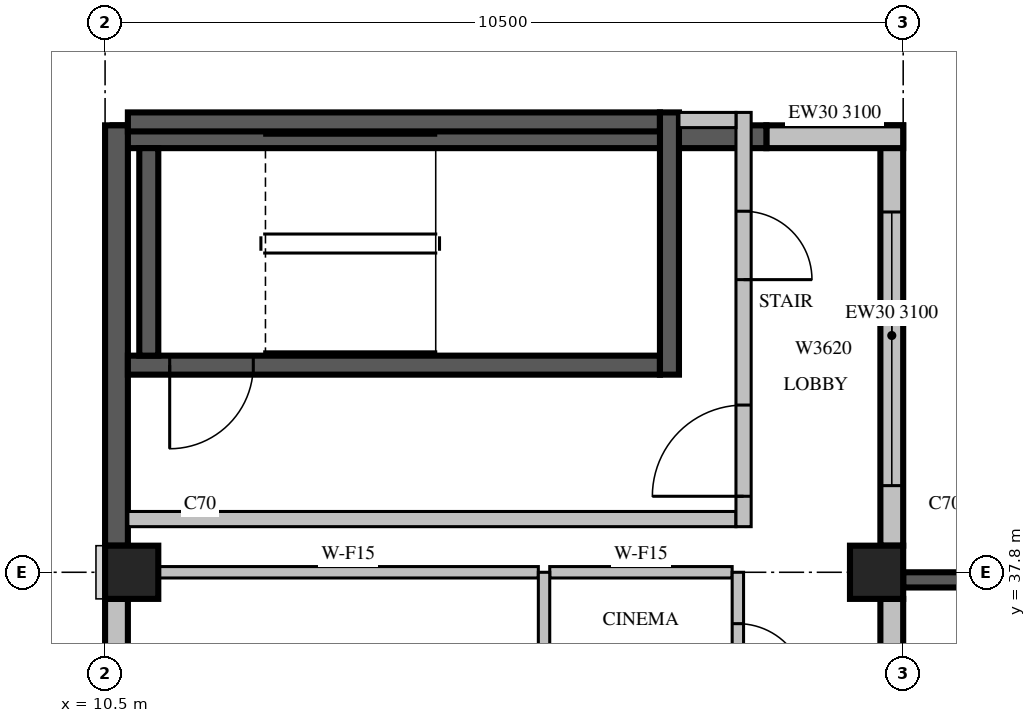
"""IFC4 building model, lengths in metres.
Left out: names, types, materials, properties, quantities, classifications, styles, units other than length and angle.
Written with IfcOpenShell. Run it as: python <this file> out.ifc"""

import sys

from ifc_helpers import new_model, si_unit, direction, frame, frame_2d, origin, origin_2d, place, context, subcontext, project, spatial, rectangle, extrude, source, transform, mapped, element, fill, save


model = new_model("IFC4")
c1 = context("Model", 3, precision=1e-05, world=origin(), true_north=direction((0.0, 1.0)))
c2 = subcontext(c1, "Body", "Model", "MODEL_VIEW")
j1 = project(units=[si_unit("LENGTHUNIT", "METRE"), si_unit("PLANEANGLEUNIT", "RADIAN")], contexts=[c1])
p1 = place(None, origin())
s1 = spatial("IfcSite", under=j1, at=p1, CompositionType="ELEMENT")
p2 = place(p1, origin())
s2 = spatial("IfcBuilding", under=s1, at=p2, CompositionType="ELEMENT")
p3 = place(p2, frame((0.0, 0.0, 302.0)))
s3 = spatial("IfcBuildingStorey", under=s2, at=p3, CompositionType="ELEMENT", Elevation=302.0)
m1 = source(origin(), c2, "Body", "SweptSolid", [
    extrude(rectangle(XDim=0.7, YDim=0.7, at=origin_2d()), origin(), (0.0, 0.0, 1.0), 3.5),
])
for number, where, z_axis, x_axis in (
    (1, (10.85, 37.8, 0.0), (0.0, 0.0, 1.0), (1.0, 0.0, 0.0)),
    (2, (20.65, 37.8, 0.0), (0.0, 0.0, 1.0), (1.0, 0.0, 0.0)),
):
    element("IfcColumn", number, at=place(p3, frame(where, z_axis=z_axis, x_axis=x_axis)), inside=s3, PredefinedType="COLUMN", context=c2, shape_type="MappedRepresentation", body=[
        mapped(m1, transform((0.0, 0.0, 0.0), scale=1.0)),
    ])
m2 = source(origin(), c2, "Body", "SweptSolid", [
    extrude(rectangle(XDim=3.9, YDim=0.2, at=frame_2d((1.95, 0.0))), origin(), (0.0, 0.0, 1.0), 3.1),
])
p4 = place(p3, frame((21.0, 37.7, 0.0), z_axis=(0.0, 0.0, 1.0), x_axis=(1.0, 0.0, 0.0)))
e3 = element("IfcWall", 3, at=p4, inside=s3, PredefinedType="SOLIDWALL", context=c2, shape_type="MappedRepresentation", body=[
    mapped(m2, transform((0.0, 0.0, 0.0), scale=1.0)),
])
m3 = source(origin(), c2, "Body", "SweptSolid", [
    extrude(rectangle(XDim=2.4, YDim=2.0, at=frame_2d((1.2, 1.0))), frame((0.0, 0.11, 0.0), z_axis=(0.0, -1.0, 0.0), x_axis=(1.0, 0.0, 0.0)), (0.0, 0.0, 1.0), 0.22),
])
p5 = place(p4, frame((0.75, 0.0, 0.6)))
e4 = element("IfcOpeningElement", 4, at=p5, cuts=e3, PredefinedType="OPENING", context=c2, shape_type="MappedRepresentation", body=[
    mapped(m3, transform((0.0, 0.0, 0.0), scale=1.0)),
])
m4 = source(origin(), c2, "Body", "SweptSolid", [
    extrude(rectangle(XDim=7.7, YDim=0.3, at=frame_2d((3.85, 0.0))), origin(), (0.0, 0.0, 1.0), 3.1),
])
p6 = place(p3, frame((20.85, 29.75, 0.0), z_axis=(0.0, 0.0, 1.0), x_axis=(0.0, 1.0, 0.0)))
e5 = element("IfcWall", 5, at=p6, inside=s3, PredefinedType="STANDARD", context=c2, shape_type="MappedRepresentation", body=[
    mapped(m4, transform((0.0, 0.0, 0.0), scale=1.0)),
])
m5 = source(origin(), c2, "Body", "SweptSolid", [
    extrude(rectangle(XDim=3.0, YDim=2.0, at=frame_2d((1.5, 1.0))), frame((0.0, 0.16, 0.0), z_axis=(0.0, -1.0, 0.0), x_axis=(1.0, 0.0, 0.0)), (0.0, 0.0, 1.0), 0.32),
])
p7 = place(p6, frame((0.25, 0.0, 0.6)))
e6 = element("IfcOpeningElement", 6, at=p7, cuts=e5, PredefinedType="OPENING", context=c2, shape_type="MappedRepresentation", body=[
    mapped(m5, transform((0.0, 0.0, 0.0), scale=1.0)),
])
m6 = source(origin(), c2, "Body", "SweptSolid", [
    extrude(rectangle(XDim=1.0, YDim=2.1, at=frame_2d((0.5, 1.05))), frame((0.0, 0.16, 0.0), z_axis=(0.0, -1.0, 0.0), x_axis=(1.0, 0.0, 0.0)), (0.0, 0.0, 1.0), 0.32),
])
p8 = place(p6, frame((5.45, 0.0, 0.0)))
e7 = element("IfcOpeningElement", 7, at=p8, cuts=e5, PredefinedType="OPENING", context=c2, shape_type="MappedRepresentation", body=[
    mapped(m6, transform((0.0, 0.0, 0.0), scale=1.0)),
])
m7 = source(origin(), c2, "Body", "SweptSolid", [
    extrude(rectangle(XDim=5.53, YDim=0.3, at=frame_2d((2.765, 0.0))), origin(), (0.0, 0.0, 1.0), 3.1),
])
p9 = place(p3, frame((20.85, 38.15, 0.0), z_axis=(0.0, 0.0, 1.0), x_axis=(0.0, 1.0, 0.0)))
e8 = element("IfcWall", 8, at=p9, inside=s3, PredefinedType="STANDARD", context=c2, shape_type="MappedRepresentation", body=[
    mapped(m7, transform((0.0, 0.0, 0.0), scale=1.0)),
])
m8 = source(origin(), c2, "Body", "SweptSolid", [
    extrude(rectangle(XDim=3.6, YDim=2.0, at=frame_2d((1.8, 1.0))), frame((0.0, 0.16, 0.0), z_axis=(0.0, -1.0, 0.0), x_axis=(1.0, 0.0, 0.0)), (0.0, 0.0, 1.0), 0.32),
])
p10 = place(p9, frame((0.79, 0.0, 0.6)))
e9 = element("IfcOpeningElement", 9, at=p10, cuts=e8, PredefinedType="OPENING", context=c2, shape_type="MappedRepresentation", body=[
    mapped(m8, transform((0.0, 0.0, 0.0), scale=1.0)),
])
m9 = source(origin(), c2, "Body", "SweptSolid", [
    extrude(rectangle(XDim=1.8, YDim=0.3, at=frame_2d((0.9, 0.0))), origin(), (0.0, 0.0, 1.0), 3.1),
])
p11 = place(p3, frame((21.0, 43.53, 0.0), z_axis=(0.0, 0.0, 1.0), x_axis=(-1.0, 0.0, 0.0)))
e10 = element("IfcWall", 10, at=p11, inside=s3, PredefinedType="STANDARD", context=c2, shape_type="MappedRepresentation", body=[
    mapped(m9, transform((0.0, 0.0, 0.0), scale=1.0)),
])
m10 = source(origin(), c2, "Body", "SweptSolid", [
    extrude(rectangle(XDim=8.6, YDim=0.3, at=frame_2d((4.3, 0.0))), origin(), (0.0, 0.0, 1.0), 3.1),
])
p12 = place(p3, frame((19.2, 43.53, 0.0), z_axis=(0.0, 0.0, 1.0), x_axis=(-1.0, 0.0, 0.0)))
e11 = element("IfcWall", 11, at=p12, inside=s3, PredefinedType="SOLIDWALL", context=c2, shape_type="MappedRepresentation", body=[
    mapped(m10, transform((0.0, 0.0, 0.0), scale=1.0)),
])
m11 = source(origin(), c2, "Body", "SweptSolid", [
    extrude(rectangle(XDim=5.53, YDim=0.3, at=frame_2d((2.765, 0.0))), origin(), (0.0, 0.0, 1.0), 3.1),
])
p13 = place(p3, frame((10.65, 43.68, 0.0), z_axis=(0.0, 0.0, 1.0), x_axis=(0.0, -1.0, 0.0)))
e12 = element("IfcWall", 12, at=p13, inside=s3, PredefinedType="SOLIDWALL", context=c2, shape_type="MappedRepresentation", body=[
    mapped(m11, transform((0.0, 0.0, 0.0), scale=1.0)),
])
m12 = source(origin(), c2, "Body", "SweptSolid", [
    extrude(rectangle(XDim=6.37, YDim=0.3, at=frame_2d((3.185, 0.0))), origin(), (0.0, 0.0, 1.0), 3.1),
])
p14 = place(p3, frame((10.65, 37.45, 0.0), z_axis=(0.0, 0.0, 1.0), x_axis=(0.0, -1.0, 0.0)))
e13 = element("IfcWall", 13, at=p14, inside=s3, PredefinedType="STANDARD", context=c2, shape_type="MappedRepresentation", body=[
    mapped(m12, transform((0.0, 0.0, 0.0), scale=1.0)),
])
p15 = place(p14, frame((2.77, 0.0, 0.6)))
e14 = element("IfcOpeningElement", 14, at=p15, cuts=e13, PredefinedType="OPENING", context=c2, shape_type="MappedRepresentation", body=[
    mapped(m5, transform((0.0, 0.0, 0.0), scale=1.0)),
])
m13 = source(origin(), c2, "Body", "SweptSolid", [
    extrude(rectangle(XDim=7.0, YDim=0.25, at=frame_2d((3.5, 0.0))), origin(), (0.0, 0.0, 1.0), 3.1),
])
p16 = place(p3, frame((10.8, 40.525, 0.0), z_axis=(0.0, 0.0, 1.0), x_axis=(1.0, 0.0, 0.0)))
e15 = element("IfcWall", 15, at=p16, inside=s3, PredefinedType="SOLIDWALL", context=c2, shape_type="MappedRepresentation", body=[
    mapped(m13, transform((0.0, 0.0, 0.0), scale=1.0)),
])
m14 = source(origin(), c2, "Body", "SweptSolid", [
    extrude(rectangle(XDim=1.1, YDim=2.1, at=frame_2d((0.55, 1.05))), frame((0.0, 0.135, 0.0), z_axis=(0.0, -1.0, 0.0), x_axis=(1.0, 0.0, 0.0)), (0.0, 0.0, 1.0), 0.27),
])
p17 = place(p16, frame((0.55, 0.0, 0.0)))
e16 = element("IfcOpeningElement", 16, at=p17, cuts=e15, PredefinedType="OPENING", context=c2, shape_type="MappedRepresentation", body=[
    mapped(m14, transform((0.0, 0.0, 0.0), scale=1.0)),
])
p18 = place(p3, frame((10.8, 43.725, 0.0), z_axis=(0.0, 0.0, 1.0), x_axis=(1.0, 0.0, 0.0)))
e17 = element("IfcWall", 17, at=p18, inside=s3, PredefinedType="SOLIDWALL", context=c2, shape_type="MappedRepresentation", body=[
    mapped(m13, transform((0.0, 0.0, 0.0), scale=1.0)),
])
m15 = source(origin(), c2, "Body", "SweptSolid", [
    extrude(rectangle(XDim=3.45, YDim=0.25, at=frame_2d((1.725, 0.0))), origin(), (0.0, 0.0, 1.0), 3.1),
])
p19 = place(p3, frame((17.925, 40.4, 0.0), z_axis=(0.0, 0.0, 1.0), x_axis=(0.0, 1.0, 0.0)))
e18 = element("IfcWall", 18, at=p19, inside=s3, PredefinedType="SOLIDWALL", context=c2, shape_type="MappedRepresentation", body=[
    mapped(m15, transform((0.0, 0.0, 0.0), scale=1.0)),
])
m16 = source(origin(), c2, "Body", "SweptSolid", [
    extrude(rectangle(XDim=2.73, YDim=0.25, at=frame_2d((1.365, 0.0))), origin(), (0.0, 0.0, 1.0), 3.1),
])
p20 = place(p3, frame((11.075, 40.65, 0.0), z_axis=(0.0, 0.0, 1.0), x_axis=(0.0, 1.0, 0.0)))
e19 = element("IfcWall", 19, at=p20, inside=s3, PredefinedType="SOLIDWALL", context=c2, shape_type="MappedRepresentation", body=[
    mapped(m16, transform((0.0, 0.0, 0.0), scale=1.0)),
])
m17 = source(origin(), c2, "Body", "SweptSolid", [
    extrude(rectangle(XDim=8.0, YDim=0.2, at=frame_2d((4.0, 0.0))), origin(), (0.0, 0.0, 1.0), 3.1),
])
p21 = place(p3, frame((10.8, 38.5, 0.0), z_axis=(0.0, 0.0, 1.0), x_axis=(1.0, 0.0, 0.0)))
e20 = element("IfcWall", 20, at=p21, inside=s3, PredefinedType="PARTITIONING", context=c2, shape_type="MappedRepresentation", body=[
    mapped(m17, transform((0.0, 0.0, 0.0), scale=1.0)),
])
m18 = source(origin(), c2, "Body", "SweptSolid", [
    extrude(rectangle(XDim=5.45, YDim=0.2, at=frame_2d((2.725, 0.0))), origin(), (0.0, 0.0, 1.0), 3.1),
])
p22 = place(p3, frame((18.9, 38.4, 0.0), z_axis=(0.0, 0.0, 1.0), x_axis=(0.0, 1.0, 0.0)))
e21 = element("IfcWall", 21, at=p22, inside=s3, PredefinedType="PARTITIONING", context=c2, shape_type="MappedRepresentation", body=[
    mapped(m18, transform((0.0, 0.0, 0.0), scale=1.0)),
])
m19 = source(origin(), c2, "Body", "SweptSolid", [
    extrude(rectangle(XDim=1.2, YDim=2.1, at=frame_2d((0.6, 1.05))), frame((0.0, 0.11, 0.0), z_axis=(0.0, -1.0, 0.0), x_axis=(1.0, 0.0, 0.0)), (0.0, 0.0, 1.0), 0.22),
])
p23 = place(p22, frame((0.4, 0.0, 0.0)))
e22 = element("IfcOpeningElement", 22, at=p23, cuts=e21, PredefinedType="OPENING", context=c2, shape_type="MappedRepresentation", body=[
    mapped(m19, transform((0.0, 0.0, 0.0), scale=1.0)),
])
m20 = source(origin(), c2, "Body", "SweptSolid", [
    extrude(rectangle(XDim=0.9, YDim=2.1, at=frame_2d((0.45, 1.05))), frame((0.0, 0.11, 0.0), z_axis=(0.0, -1.0, 0.0), x_axis=(1.0, 0.0, 0.0)), (0.0, 0.0, 1.0), 0.22),
])
p24 = place(p22, frame((3.25, 0.0, 0.0)))
e23 = element("IfcOpeningElement", 23, at=p24, cuts=e21, PredefinedType="OPENING", context=c2, shape_type="MappedRepresentation", body=[
    mapped(m20, transform((0.0, 0.0, 0.0), scale=1.0)),
])
m21 = source(origin(), c2, "Body", "SweptSolid", [
    extrude(rectangle(XDim=0.75, YDim=0.2, at=frame_2d((0.375, 0.0))), origin(), (0.0, 0.0, 1.0), 3.1),
])
p25 = place(p3, frame((18.05, 43.75, 0.0), z_axis=(0.0, 0.0, 1.0), x_axis=(1.0, 0.0, 0.0)))
e24 = element("IfcWall", 24, at=p25, inside=s3, PredefinedType="PARTITIONING", context=c2, shape_type="MappedRepresentation", body=[
    mapped(m21, transform((0.0, 0.0, 0.0), scale=1.0)),
])
m22 = source(origin(), c2, "Body", "SweptSolid", [
    extrude(rectangle(XDim=5.001, YDim=0.15, at=frame_2d((2.501, 0.0))), origin(), (0.0, 0.0, 1.0), 3.1),
])
p26 = place(p3, frame((16.2, 37.8, 0.0), z_axis=(0.0, 0.0, 1.0), x_axis=(-1.0, 0.0, 0.0)))
e25 = element("IfcWall", 25, at=p26, inside=s3, PredefinedType="PARTITIONING", context=c2, shape_type="MappedRepresentation", body=[
    mapped(m22, transform((0.0, 0.0, 0.0), scale=1.0)),
])
m23 = source(origin(), c2, "Body", "SweptSolid", [
    extrude(rectangle(XDim=2.4, YDim=0.15, at=frame_2d((1.2, 0.0))), origin(), (0.0, 0.0, 1.0), 3.1),
])
p27 = place(p3, frame((18.75, 37.8, 0.0), z_axis=(0.0, 0.0, 1.0), x_axis=(-1.0, 0.0, 0.0)))
e26 = element("IfcWall", 26, at=p27, inside=s3, PredefinedType="PARTITIONING", context=c2, shape_type="MappedRepresentation", body=[
    mapped(m23, transform((0.0, 0.0, 0.0), scale=1.0)),
])
m24 = source(origin(), c2, "Body", "SweptSolid", [
    extrude(rectangle(XDim=8.4, YDim=0.15, at=frame_2d((4.2, 0.0))), origin(), (0.0, 0.0, 1.0), 3.1),
])
p28 = place(p3, frame((16.275, 29.4, 0.0), z_axis=(0.0, 0.0, 1.0), x_axis=(0.0, 1.0, 0.0)))
e27 = element("IfcWall", 27, at=p28, inside=s3, PredefinedType="PARTITIONING", context=c2, shape_type="MappedRepresentation", body=[
    mapped(m24, transform((0.0, 0.0, 0.0), scale=1.0)),
])
m25 = source(origin(), c2, "Body", "SweptSolid", [
    extrude(rectangle(XDim=1.2, YDim=2.1, at=frame_2d((0.6, 1.05))), frame((0.0, 0.085, 0.0), z_axis=(0.0, -1.0, 0.0), x_axis=(1.0, 0.0, 0.0)), (0.0, 0.0, 1.0), 0.17),
])
p29 = place(p28, frame((2.524, 0.0, 0.0)))
e28 = element("IfcOpeningElement", 28, at=p29, cuts=e27, PredefinedType="OPENING", context=c2, shape_type="MappedRepresentation", body=[
    mapped(m25, transform((0.0, 0.0, 0.0), scale=1.0)),
])
p30 = place(p3, frame((18.825, 29.4, 0.0), z_axis=(0.0, 0.0, 1.0), x_axis=(0.0, 1.0, 0.0)))
e29 = element("IfcWall", 29, at=p30, inside=s3, PredefinedType="PARTITIONING", context=c2, shape_type="MappedRepresentation", body=[
    mapped(m24, transform((0.0, 0.0, 0.0), scale=1.0)),
])
p31 = place(p30, frame((2.474, 0.0, 0.0)))
e30 = element("IfcOpeningElement", 30, at=p31, cuts=e29, PredefinedType="OPENING", context=c2, shape_type="MappedRepresentation", body=[
    mapped(m25, transform((0.0, 0.0, 0.0), scale=1.0)),
])
m26 = source(origin(), c2, "Body", "SweptSolid", [
    extrude(rectangle(XDim=0.9, YDim=2.1, at=frame_2d((0.45, 1.05))), frame((0.0, 0.085, 0.0), z_axis=(0.0, -1.0, 0.0), x_axis=(1.0, 0.0, 0.0)), (0.0, 0.0, 1.0), 0.17),
])
p32 = place(p30, frame((6.824, 0.0, 0.0)))
e31 = element("IfcOpeningElement", 31, at=p32, cuts=e29, PredefinedType="OPENING", context=c2, shape_type="MappedRepresentation", body=[
    mapped(m26, transform((0.0, 0.0, 0.0), scale=1.0)),
])
m27 = source(origin(), c2, "Body", "SweptSolid", [
    extrude(rectangle(XDim=3.6, YDim=2.0, at=frame_2d((1.8, 1.0))), frame((0.0, 0.03, 0.0), z_axis=(0.0, -1.0, 0.0), x_axis=(1.0, 0.0, 0.0)), (0.0, 0.0, 1.0), 0.06),
])
p33 = place(p10, origin())
e32 = element("IfcWindow", 32, at=p33, inside=s3, PartitioningType="SINGLE_PANEL", PredefinedType="WINDOW", context=c2, shape_type="MappedRepresentation", body=[
    mapped(m27, transform((0.0, 0.0, 0.0), scale=1.0)),
])
fill(e9, e32)
m28 = source(origin(), c2, "Body", "SweptSolid", [
    extrude(rectangle(XDim=1.1, YDim=2.1, at=frame_2d((0.55, 1.05))), frame((0.0, 0.025, 0.0), z_axis=(0.0, -1.0, 0.0), x_axis=(1.0, 0.0, 0.0)), (0.0, 0.0, 1.0), 0.05),
])
p34 = place(p17, origin())
e33 = element("IfcDoor", 33, at=p34, inside=s3, OperationType="SINGLE_SWING_RIGHT", PredefinedType="DOOR", context=c2, shape_type="MappedRepresentation", body=[
    mapped(m28, transform((0.0, 0.0, 0.0), scale=1.0)),
])
fill(e16, e33)
m29 = source(origin(), c2, "Body", "SweptSolid", [
    extrude(rectangle(XDim=1.2, YDim=2.1, at=frame_2d((0.6, 1.05))), frame((0.0, 0.025, 0.0), z_axis=(0.0, -1.0, 0.0), x_axis=(1.0, 0.0, 0.0)), (0.0, 0.0, 1.0), 0.05),
])
p35 = place(p23, origin())
e34 = element("IfcDoor", 34, at=p35, inside=s3, OperationType="SINGLE_SWING_LEFT", PredefinedType="DOOR", context=c2, shape_type="MappedRepresentation", body=[
    mapped(m29, transform((0.0, 0.0, 0.0), scale=1.0)),
])
fill(e22, e34)
m30 = source(origin(), c2, "Body", "SweptSolid", [
    extrude(rectangle(XDim=0.9, YDim=2.1, at=frame_2d((0.45, 1.05))), frame((0.0, 0.025, 0.0), z_axis=(0.0, -1.0, 0.0), x_axis=(1.0, 0.0, 0.0)), (0.0, 0.0, 1.0), 0.05),
])
p36 = place(p24, origin())
e35 = element("IfcDoor", 35, at=p36, inside=s3, OperationType="SINGLE_SWING_RIGHT", PredefinedType="DOOR", context=c2, shape_type="MappedRepresentation", body=[
    mapped(m30, transform((0.0, 0.0, 0.0), scale=1.0)),
])
fill(e23, e35)
p37 = place(p32, origin())
e36 = element("IfcDoor", 36, at=p37, inside=s3, OperationType="SINGLE_SWING_RIGHT", PredefinedType="DOOR", context=c2, shape_type="MappedRepresentation", body=[
    mapped(m30, transform((0.0, 0.0, 0.0), scale=1.0)),
])
fill(e31, e36)
save(model, sys.argv[1])
